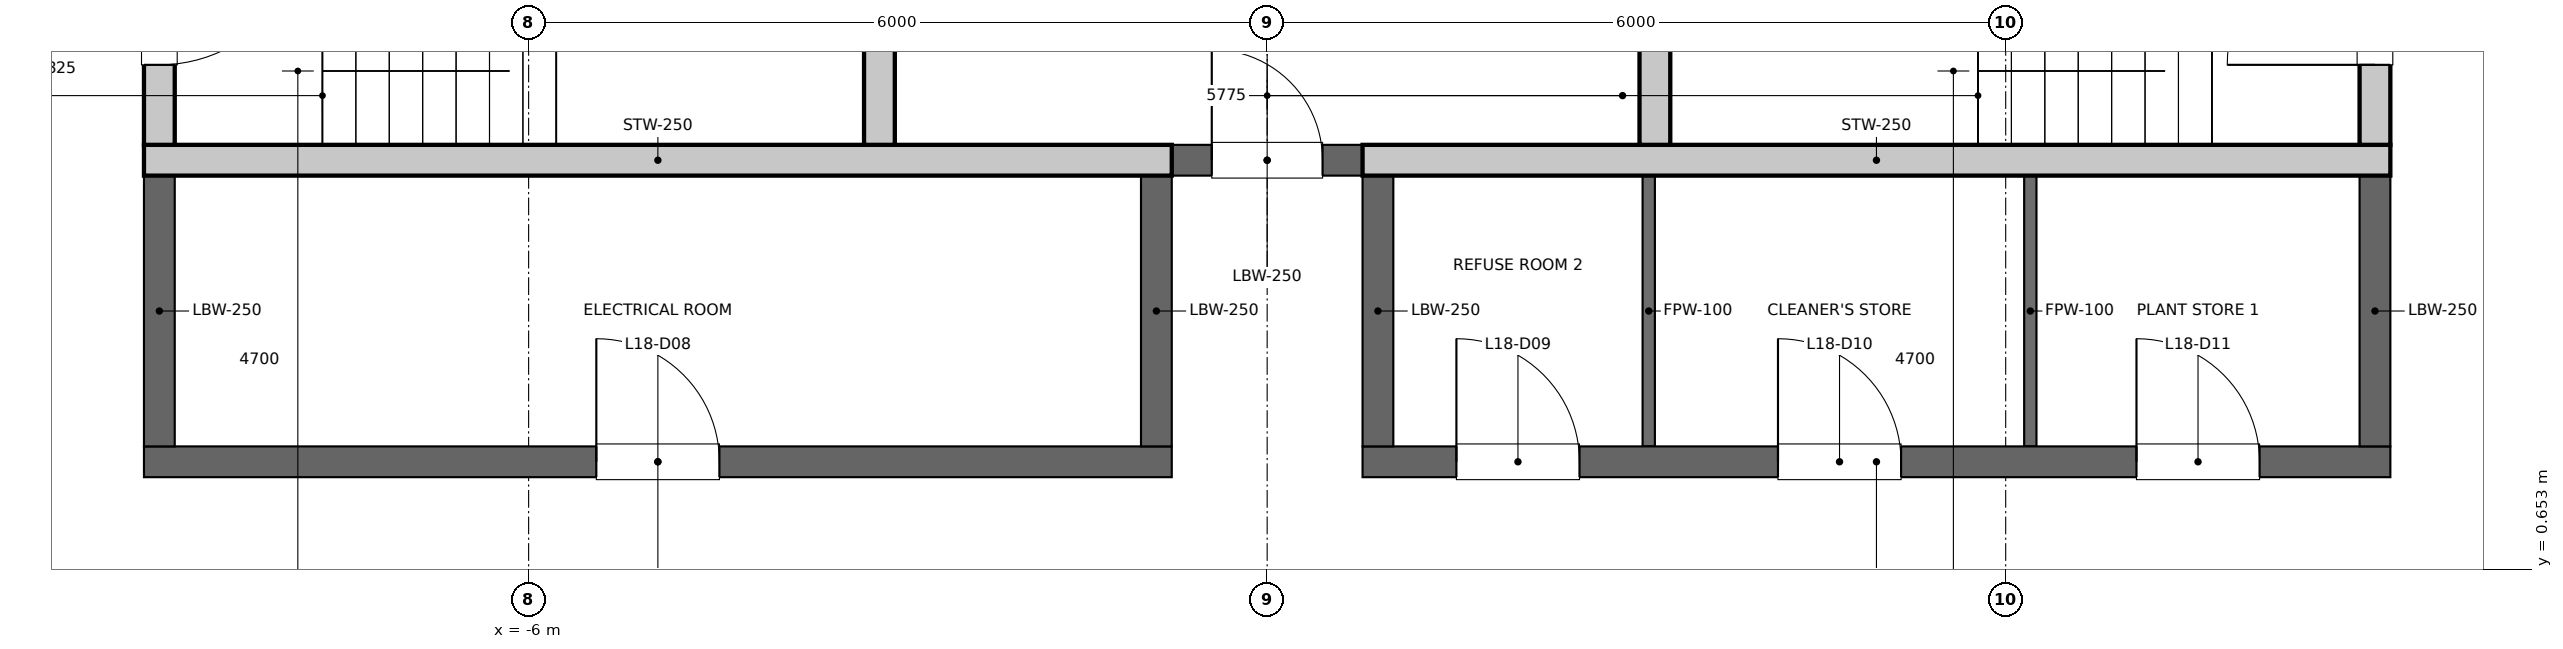
"""IFC4 building model, lengths in metres.
Left out: names, types, materials, properties, quantities, classifications, styles, units other than length and angle.
Written with IfcOpenShell. Run it as: python <this file> out.ifc"""

import sys

from ifc_helpers import new_model, si_unit, direction, frame, frame_2d, origin, place, context, subcontext, project, spatial, rectangle, extrude, element, fill, save


model = new_model("IFC4")
c1 = context("Model", 3, precision=1e-05, world=origin(), true_north=direction((0.0, 1.0)))
c2 = subcontext(c1, "Body", "Model", "MODEL_VIEW")
j1 = project(units=[si_unit("LENGTHUNIT", "METRE"), si_unit("PLANEANGLEUNIT", "RADIAN")], contexts=[c1])
p1 = place(None, origin())
s1 = spatial("IfcSite", under=j1, at=p1, CompositionType="ELEMENT")
p2 = place(p1, origin())
s2 = spatial("IfcBuilding", under=s1, at=p2, CompositionType="ELEMENT")
p3 = place(p2, frame((0.0, 0.0, 96.6)))
s3 = spatial("IfcBuildingStorey", under=s2, at=p3, CompositionType="ELEMENT", Elevation=96.6)
p4 = place(p3, frame((-9.0, 4.1, 0.0), z_axis=(0.0, 0.0, 1.0), x_axis=(0.0, 1.0, 0.0)))
e1 = element("IfcWall", 1, at=p4, inside=s3, PredefinedType="SOLIDWALL", context=c2, shape_type="SweptSolid", body=[
    extrude(rectangle(XDim=2.5, YDim=0.25, at=frame_2d((1.25, 0.0))), origin(), (0.0, 0.0, 1.0), 5.25),
])
p5 = place(p4, frame((0.65, 0.0, 0.0)))
e2 = element("IfcOpeningElement", 2, at=p5, cuts=e1, PredefinedType="OPENING", context=c2, shape_type="SweptSolid", body=[
    extrude(rectangle(XDim=1.2, YDim=2.1, at=frame_2d((0.6, 1.05))), frame((0.0, 0.125, 0.0), z_axis=(0.0, -1.0, 0.0), x_axis=(1.0, 0.0, 0.0)), (0.0, 0.0, 1.0), 0.25),
])
p6 = place(p3, frame((9.0, 4.1, 0.0), z_axis=(0.0, 0.0, 1.0), x_axis=(0.0, 1.0, 0.0)))
e3 = element("IfcWall", 3, at=p6, inside=s3, PredefinedType="SOLIDWALL", context=c2, shape_type="SweptSolid", body=[
    extrude(rectangle(XDim=2.5, YDim=0.25, at=frame_2d((1.25, 0.0))), origin(), (0.0, 0.0, 1.0), 5.25),
])
p7 = place(p6, frame((0.65, 0.0, 0.0)))
e4 = element("IfcOpeningElement", 4, at=p7, cuts=e3, PredefinedType="OPENING", context=c2, shape_type="SweptSolid", body=[
    extrude(rectangle(XDim=1.2, YDim=2.1, at=frame_2d((0.6, 1.05))), frame((0.0, 0.125, 0.0), z_axis=(0.0, -1.0, 0.0), x_axis=(1.0, 0.0, 0.0)), (0.0, 0.0, 1.0), 0.25),
])
for number, where, z_axis, x_axis in (
    (5, (-3.15, 4.1, 0.0), (0.0, 0.0, 1.0), (0.0, 1.0, 0.0)),
    (6, (3.15, 4.1, 0.0), (0.0, 0.0, 1.0), (0.0, 1.0, 0.0)),
):
    element("IfcWall", number, at=place(p3, frame(where, z_axis=z_axis, x_axis=x_axis)), inside=s3, PredefinedType="SOLIDWALL", context=c2, shape_type="SweptSolid", body=[
        extrude(rectangle(XDim=2.5, YDim=0.25, at=frame_2d((1.25, 0.0))), origin(), (0.0, 0.0, 1.0), 5.25),
    ])
p8 = place(p3, frame((-0.775, 3.975, 0.0), z_axis=(0.0, 0.0, 1.0), x_axis=(1.0, 0.0, 0.0)))
e7 = element("IfcWall", 7, at=p8, inside=s3, PredefinedType="PARTITIONING", context=c2, shape_type="SweptSolid", body=[
    extrude(rectangle(XDim=1.55, YDim=0.25, at=frame_2d((0.775, 0.0))), origin(), (0.0, 0.0, 1.0), 5.25),
])
p9 = place(p8, frame((0.325, 0.0, 0.0)))
e8 = element("IfcOpeningElement", 8, at=p9, cuts=e7, PredefinedType="OPENING", context=c2, shape_type="SweptSolid", body=[
    extrude(rectangle(XDim=0.9, YDim=2.1, at=frame_2d((0.45, 1.05))), frame((0.0, 0.125, 0.0), z_axis=(0.0, -1.0, 0.0), x_axis=(1.0, 0.0, 0.0)), (0.0, 0.0, 1.0), 0.25),
])
p10 = place(p3, frame((-9.125, 1.525, 0.0), z_axis=(0.0, 0.0, 1.0), x_axis=(1.0, 0.0, 0.0)))
e9 = element("IfcWall", 9, at=p10, inside=s3, PredefinedType="PARTITIONING", context=c2, shape_type="SweptSolid", body=[
    extrude(rectangle(XDim=8.35, YDim=0.25, at=frame_2d((4.175, 0.0))), origin(), (0.0, 0.0, 1.0), 5.25),
])
p11 = place(p10, frame((3.675, 0.0, 0.0)))
e10 = element("IfcOpeningElement", 10, at=p11, cuts=e9, PredefinedType="OPENING", context=c2, shape_type="SweptSolid", body=[
    extrude(rectangle(XDim=1.0, YDim=2.1, at=frame_2d((0.5, 1.05))), frame((0.0, 0.125, 0.0), z_axis=(0.0, -1.0, 0.0), x_axis=(1.0, 0.0, 0.0)), (0.0, 0.0, 1.0), 0.25),
])
p12 = place(p3, frame((0.775, 1.525, 0.0), z_axis=(0.0, 0.0, 1.0), x_axis=(1.0, 0.0, 0.0)))
e11 = element("IfcWall", 11, at=p12, inside=s3, PredefinedType="PARTITIONING", context=c2, shape_type="SweptSolid", body=[
    extrude(rectangle(XDim=8.35, YDim=0.25, at=frame_2d((4.175, 0.0))), origin(), (0.0, 0.0, 1.0), 5.25),
])
p13 = place(p12, frame((0.762, 0.0, 0.0)))
e12 = element("IfcOpeningElement", 12, at=p13, cuts=e11, PredefinedType="OPENING", context=c2, shape_type="SweptSolid", body=[
    extrude(rectangle(XDim=1.0, YDim=2.1, at=frame_2d((0.5, 1.05))), frame((0.0, 0.125, 0.0), z_axis=(0.0, -1.0, 0.0), x_axis=(1.0, 0.0, 0.0)), (0.0, 0.0, 1.0), 0.25),
])
p14 = place(p12, frame((3.375, 0.0, 0.0)))
e13 = element("IfcOpeningElement", 13, at=p14, cuts=e11, PredefinedType="OPENING", context=c2, shape_type="SweptSolid", body=[
    extrude(rectangle(XDim=1.0, YDim=2.1, at=frame_2d((0.5, 1.05))), frame((0.0, 0.125, 0.0), z_axis=(0.0, -1.0, 0.0), x_axis=(1.0, 0.0, 0.0)), (0.0, 0.0, 1.0), 0.25),
])
p15 = place(p12, frame((6.288, 0.0, 0.0)))
e14 = element("IfcOpeningElement", 14, at=p15, cuts=e11, PredefinedType="OPENING", context=c2, shape_type="SweptSolid", body=[
    extrude(rectangle(XDim=1.0, YDim=2.1, at=frame_2d((0.5, 1.05))), frame((0.0, 0.125, 0.0), z_axis=(0.0, -1.0, 0.0), x_axis=(1.0, 0.0, 0.0)), (0.0, 0.0, 1.0), 0.25),
])
for number, where, z_axis, x_axis in (
    (15, (-9.125, 3.975, 0.0), (0.0, 0.0, 1.0), (1.0, 0.0, 0.0)),
    (16, (0.775, 3.975, 0.0), (0.0, 0.0, 1.0), (1.0, 0.0, 0.0)),
):
    element("IfcWall", number, at=place(p3, frame(where, z_axis=z_axis, x_axis=x_axis)), inside=s3, PredefinedType="SOLIDWALL", context=c2, shape_type="SweptSolid", body=[
        extrude(rectangle(XDim=8.35, YDim=0.25, at=frame_2d((4.175, 0.0))), origin(), (0.0, 0.0, 1.0), 5.25),
    ])
for number, where, z_axis, x_axis in (
    (17, (-9.0, 1.65, 0.0), (0.0, 0.0, 1.0), (0.0, 1.0, 0.0)),
    (18, (-0.9, 1.65, 0.0), (0.0, 0.0, 1.0), (0.0, 1.0, 0.0)),
    (19, (9.0, 1.65, 0.0), (0.0, 0.0, 1.0), (0.0, 1.0, 0.0)),
    (20, (0.9, 1.65, 0.0), (0.0, 0.0, 1.0), (0.0, 1.0, 0.0)),
):
    element("IfcWall", number, at=place(p3, frame(where, z_axis=z_axis, x_axis=x_axis)), inside=s3, PredefinedType="PARTITIONING", context=c2, shape_type="SweptSolid", body=[
        extrude(rectangle(XDim=2.2, YDim=0.25, at=frame_2d((1.1, 0.0))), origin(), (0.0, 0.0, 1.0), 5.25),
    ])
for number, where, z_axis, x_axis in (
    (21, (3.1, 1.65, 0.0), (0.0, 0.0, 1.0), (0.0, 1.0, 0.0)),
    (22, (6.2, 1.65, 0.0), (0.0, 0.0, 1.0), (0.0, 1.0, 0.0)),
):
    element("IfcWall", number, at=place(p3, frame(where, z_axis=z_axis, x_axis=x_axis)), inside=s3, PredefinedType="PARTITIONING", context=c2, shape_type="SweptSolid", body=[
        extrude(rectangle(XDim=2.2, YDim=0.1, at=frame_2d((1.1, 0.0))), origin(), (0.0, 0.0, 1.0), 5.25),
    ])
p16 = place(p5, origin())
e23 = element("IfcDoor", 23, at=p16, inside=s3, OperationType="SINGLE_SWING_RIGHT", PredefinedType="DOOR", context=c2, shape_type="SweptSolid", body=[
    extrude(rectangle(XDim=1.2, YDim=2.1, at=frame_2d((0.6, 1.05))), frame((0.0, 0.025, 0.0), z_axis=(0.0, -1.0, 0.0), x_axis=(1.0, 0.0, 0.0)), (0.0, 0.0, 1.0), 0.05),
])
fill(e2, e23)
p17 = place(p7, origin())
e24 = element("IfcDoor", 24, at=p17, inside=s3, OperationType="SINGLE_SWING_LEFT", PredefinedType="DOOR", context=c2, shape_type="SweptSolid", body=[
    extrude(rectangle(XDim=1.2, YDim=2.1, at=frame_2d((0.6, 1.05))), frame((0.0, 0.025, 0.0), z_axis=(0.0, -1.0, 0.0), x_axis=(1.0, 0.0, 0.0)), (0.0, 0.0, 1.0), 0.05),
])
fill(e4, e24)
p18 = place(p9, origin())
e25 = element("IfcDoor", 25, at=p18, inside=s3, OperationType="SINGLE_SWING_LEFT", PredefinedType="DOOR", context=c2, shape_type="SweptSolid", body=[
    extrude(rectangle(XDim=0.9, YDim=2.1, at=frame_2d((0.45, 1.05))), frame((0.0, 0.025, 0.0), z_axis=(0.0, -1.0, 0.0), x_axis=(1.0, 0.0, 0.0)), (0.0, 0.0, 1.0), 0.05),
])
fill(e8, e25)
p19 = place(p11, origin())
e26 = element("IfcDoor", 26, at=p19, inside=s3, OperationType="SINGLE_SWING_LEFT", PredefinedType="DOOR", context=c2, shape_type="SweptSolid", body=[
    extrude(rectangle(XDim=1.0, YDim=2.1, at=frame_2d((0.5, 1.05))), frame((0.0, 0.025, 0.0), z_axis=(0.0, -1.0, 0.0), x_axis=(1.0, 0.0, 0.0)), (0.0, 0.0, 1.0), 0.05),
])
fill(e10, e26)
p20 = place(p13, origin())
e27 = element("IfcDoor", 27, at=p20, inside=s3, OperationType="SINGLE_SWING_LEFT", PredefinedType="DOOR", context=c2, shape_type="SweptSolid", body=[
    extrude(rectangle(XDim=1.0, YDim=2.1, at=frame_2d((0.5, 1.05))), frame((0.0, 0.025, 0.0), z_axis=(0.0, -1.0, 0.0), x_axis=(1.0, 0.0, 0.0)), (0.0, 0.0, 1.0), 0.05),
])
fill(e12, e27)
p21 = place(p14, origin())
e28 = element("IfcDoor", 28, at=p21, inside=s3, OperationType="SINGLE_SWING_LEFT", PredefinedType="DOOR", context=c2, shape_type="SweptSolid", body=[
    extrude(rectangle(XDim=1.0, YDim=2.1, at=frame_2d((0.5, 1.05))), frame((0.0, 0.025, 0.0), z_axis=(0.0, -1.0, 0.0), x_axis=(1.0, 0.0, 0.0)), (0.0, 0.0, 1.0), 0.05),
])
fill(e13, e28)
p22 = place(p15, origin())
e29 = element("IfcDoor", 29, at=p22, inside=s3, OperationType="SINGLE_SWING_LEFT", PredefinedType="DOOR", context=c2, shape_type="SweptSolid", body=[
    extrude(rectangle(XDim=1.0, YDim=2.1, at=frame_2d((0.5, 1.05))), frame((0.0, 0.025, 0.0), z_axis=(0.0, -1.0, 0.0), x_axis=(1.0, 0.0, 0.0)), (0.0, 0.0, 1.0), 0.05),
])
fill(e14, e29)
save(model, sys.argv[1])
